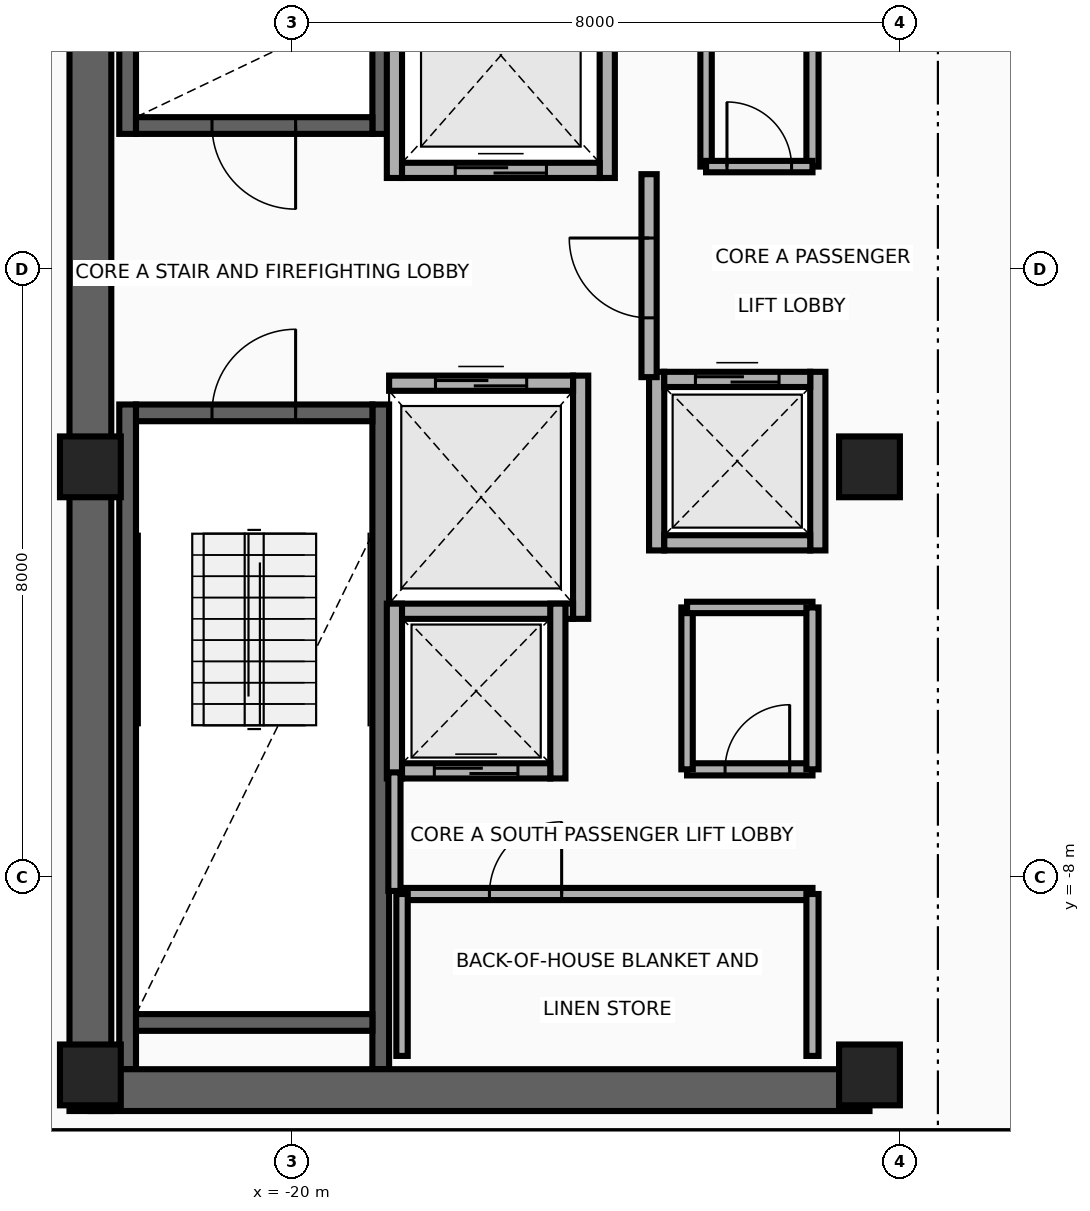
"""IFC4 building model, lengths in metres.
Left out: names, types, materials, properties, quantities, classifications, styles, units other than length and angle.
Written with IfcOpenShell. Run it as: python <this file> out.ifc"""

import sys

from ifc_helpers import new_model, si_unit, direction, frame, frame_2d, origin, origin_2d, place, context, subcontext, project, spatial, rectangle, extrude, source, transform, mapped, element, fill, save


model = new_model("IFC4")
c1 = context("Model", 3, precision=1e-05, world=origin(), true_north=direction((0.0, 1.0)))
c2 = subcontext(c1, "Body", "Model", "MODEL_VIEW")
j1 = project(units=[si_unit("LENGTHUNIT", "METRE"), si_unit("PLANEANGLEUNIT", "RADIAN")], contexts=[c1])
p1 = place(None, origin())
s1 = spatial("IfcSite", under=j1, at=p1, CompositionType="ELEMENT")
p2 = place(p1, origin())
s2 = spatial("IfcBuilding", under=s1, at=p2, CompositionType="ELEMENT")
p3 = place(p2, frame((0.0, 0.0, 269.5)))
s3 = spatial("IfcBuildingStorey", under=s2, at=p3, CompositionType="ELEMENT", Elevation=269.5)
for number, where, z_axis, x_axis in (
    (1, (-22.16, 1.78, 0.0), (0.0, 0.0, 1.0), (0.0, 1.0, 0.0)),
    (2, (-18.83, 1.78, 0.0), (0.0, 0.0, 1.0), (0.0, 1.0, 0.0)),
):
    element("IfcWall", number, at=place(p3, frame(where, z_axis=z_axis, x_axis=x_axis)), inside=s3, PredefinedType="SHEAR", context=c2, shape_type="SweptSolid", body=[
        extrude(rectangle(XDim=8.745, YDim=0.22, at=frame_2d((4.373, 0.0))), origin(), (0.0, 0.0, 1.0), 3.26),
    ])
p4 = place(p3, frame((-22.05, 1.89, 0.0), z_axis=(0.0, 0.0, 1.0), x_axis=(1.0, 0.0, 0.0)))
e3 = element("IfcWall", 3, at=p4, inside=s3, PredefinedType="SHEAR", context=c2, shape_type="SweptSolid", body=[
    extrude(rectangle(XDim=3.11, YDim=0.22, at=frame_2d((1.555, 0.0))), origin(), (0.0, 0.0, 1.0), 3.26),
])
p5 = place(p4, frame((1.0, 0.0, 0.0)))
e4 = element("IfcOpeningElement", 4, at=p5, cuts=e3, PredefinedType="OPENING", context=c2, shape_type="SweptSolid", body=[
    extrude(rectangle(XDim=1.1, YDim=2.15, at=frame_2d((0.55, 1.075))), frame((0.0, 0.125, 0.0), z_axis=(0.0, -1.0, 0.0), x_axis=(1.0, 0.0, 0.0)), (0.0, 0.0, 1.0), 0.25),
])
for number, where, z_axis, x_axis in (
    (5, (-22.16, -10.525, 0.0), (0.0, 0.0, 1.0), (0.0, 1.0, 0.0)),
    (6, (-18.83, -10.525, 0.0), (0.0, 0.0, 1.0), (0.0, 1.0, 0.0)),
):
    element("IfcWall", number, at=place(p3, frame(where, z_axis=z_axis, x_axis=x_axis)), inside=s3, PredefinedType="SHEAR", context=c2, shape_type="SweptSolid", body=[
        extrude(rectangle(XDim=8.745, YDim=0.22, at=frame_2d((4.373, 0.0))), origin(), (0.0, 0.0, 1.0), 3.26),
    ])
p6 = place(p3, frame((-22.05, -9.91, 0.0), z_axis=(0.0, 0.0, 1.0), x_axis=(1.0, 0.0, 0.0)))
e7 = element("IfcWall", 7, at=p6, inside=s3, PredefinedType="SHEAR", context=c2, shape_type="SweptSolid", body=[
    extrude(rectangle(XDim=3.11, YDim=0.22, at=frame_2d((1.555, 0.0))), origin(), (0.0, 0.0, 1.0), 3.26),
])
p7 = place(p3, frame((-22.05, -1.89, 0.0), z_axis=(0.0, 0.0, 1.0), x_axis=(1.0, 0.0, 0.0)))
e8 = element("IfcWall", 8, at=p7, inside=s3, PredefinedType="SHEAR", context=c2, shape_type="SweptSolid", body=[
    extrude(rectangle(XDim=3.11, YDim=0.22, at=frame_2d((1.555, 0.0))), origin(), (0.0, 0.0, 1.0), 3.26),
])
p8 = place(p7, frame((1.0, 0.0, 0.0)))
e9 = element("IfcOpeningElement", 9, at=p8, cuts=e8, PredefinedType="OPENING", context=c2, shape_type="SweptSolid", body=[
    extrude(rectangle(XDim=1.1, YDim=2.15, at=frame_2d((0.55, 1.075))), frame((0.0, 0.125, 0.0), z_axis=(0.0, -1.0, 0.0), x_axis=(1.0, 0.0, 0.0)), (0.0, 0.0, 1.0), 0.25),
])
p9 = place(p3, frame((-22.65, -11.075, 0.0), z_axis=(0.0, 0.0, 1.0), x_axis=(0.0, 1.0, 0.0)))
e10 = element("IfcWall", 10, at=p9, inside=s3, PredefinedType="SHEAR", context=c2, shape_type="SweptSolid", body=[
    extrude(rectangle(XDim=22.15, YDim=0.55, at=frame_2d((11.075, 0.0))), origin(), (0.0, 0.0, 1.0), 3.26),
])
p10 = place(p3, frame((-22.65, -10.8, 0.0), z_axis=(0.0, 0.0, 1.0), x_axis=(1.0, 0.0, 0.0)))
e11 = element("IfcWall", 11, at=p10, inside=s3, PredefinedType="SHEAR", context=c2, shape_type="SweptSolid", body=[
    extrude(rectangle(XDim=10.25, YDim=0.55, at=frame_2d((5.125, 0.0))), origin(), (0.0, 0.0, 1.0), 3.26),
])
m1 = source(origin(), c2, "Body", "SweptSolid", [
    extrude(rectangle(XDim=0.8, YDim=0.8, at=origin_2d()), origin(), (0.0, 0.0, 1.0), 3.5),
])
for number, where, z_axis, x_axis in (
    (12, (-22.65, -10.6, 0.0), (0.0, 0.0, 1.0), (1.0, 0.0, 0.0)),
    (13, (-12.4, -10.6, 0.0), (0.0, 0.0, 1.0), (1.0, 0.0, 0.0)),
    (14, (-22.65, -2.6, 0.0), (0.0, 0.0, 1.0), (1.0, 0.0, 0.0)),
    (15, (-12.4, -2.6, 0.0), (0.0, 0.0, 1.0), (1.0, 0.0, 0.0)),
):
    element("IfcColumn", number, at=place(p3, frame(where, z_axis=z_axis, x_axis=x_axis)), inside=s3, PredefinedType="COLUMN", context=c2, shape_type="MappedRepresentation", body=[
        mapped(m1, transform((0.0, 0.0, 0.0), x_axis=(1.0, 0.0, 0.0), y_axis=(0.0, 1.0, 0.0), z_axis=(0.0, 0.0, 1.0), scale=1.0)),
    ])
for number, where, z_axis, x_axis in (
    (16, (-18.65, 1.2, 0.0), (0.0, 0.0, 1.0), (0.0, 1.0, 0.0)),
    (17, (-15.85, 1.2, 0.0), (0.0, 0.0, 1.0), (0.0, 1.0, 0.0)),
):
    element("IfcWall", number, at=place(p3, frame(where, z_axis=z_axis, x_axis=x_axis)), inside=s3, PredefinedType="MOVABLE", context=c2, shape_type="SweptSolid", body=[
        extrude(rectangle(XDim=3.225, YDim=0.2, at=frame_2d((1.613, 0.0))), origin(), (0.0, 0.0, 1.0), 3.26),
    ])
p11 = place(p3, frame((-18.55, 1.3, 0.0), z_axis=(0.0, 0.0, 1.0), x_axis=(1.0, 0.0, 0.0)))
e18 = element("IfcWall", 18, at=p11, inside=s3, PredefinedType="MOVABLE", context=c2, shape_type="SweptSolid", body=[
    extrude(rectangle(XDim=2.6, YDim=0.2, at=frame_2d((1.3, 0.0))), origin(), (0.0, 0.0, 1.0), 3.26),
])
p12 = place(p11, frame((0.7, 0.0, 0.0)))
e19 = element("IfcOpeningElement", 19, at=p12, cuts=e18, PredefinedType="OPENING", context=c2, shape_type="SweptSolid", body=[
    extrude(rectangle(XDim=1.2, YDim=2.1, at=frame_2d((0.6, 1.05))), frame((0.0, 0.115, 0.0), z_axis=(0.0, -1.0, 0.0), x_axis=(1.0, 0.0, 0.0)), (0.0, 0.0, 1.0), 0.23),
])
p13 = place(p3, frame((-16.2, -4.6, 0.0), z_axis=(0.0, 0.0, 1.0), x_axis=(0.0, 1.0, 0.0)))
e20 = element("IfcWall", 20, at=p13, inside=s3, PredefinedType="MOVABLE", context=c2, shape_type="SweptSolid", body=[
    extrude(rectangle(XDim=3.2, YDim=0.2, at=frame_2d((1.6, 0.0))), origin(), (0.0, 0.0, 1.0), 3.26),
])
p14 = place(p3, frame((-18.72, -4.5, 0.0), z_axis=(0.0, 0.0, 1.0), x_axis=(1.0, 0.0, 0.0)))
e21 = element("IfcWall", 21, at=p14, inside=s3, PredefinedType="MOVABLE", context=c2, shape_type="SweptSolid", body=[
    extrude(rectangle(XDim=2.42, YDim=0.2, at=frame_2d((1.21, 0.0))), origin(), (0.0, 0.0, 1.0), 3.26),
])
p15 = place(p3, frame((-18.72, -1.5, 0.0), z_axis=(0.0, 0.0, 1.0), x_axis=(1.0, 0.0, 0.0)))
e22 = element("IfcWall", 22, at=p15, inside=s3, PredefinedType="MOVABLE", context=c2, shape_type="SweptSolid", body=[
    extrude(rectangle(XDim=2.42, YDim=0.2, at=frame_2d((1.21, 0.0))), origin(), (0.0, 0.0, 1.0), 3.26),
])
p16 = place(p15, frame((0.61, 0.0, 0.0)))
e23 = element("IfcOpeningElement", 23, at=p16, cuts=e22, PredefinedType="OPENING", context=c2, shape_type="SweptSolid", body=[
    extrude(rectangle(XDim=1.2, YDim=2.1, at=frame_2d((0.6, 1.05))), frame((0.0, 0.115, 0.0), z_axis=(0.0, -1.0, 0.0), x_axis=(1.0, 0.0, 0.0)), (0.0, 0.0, 1.0), 0.23),
])
for number, where, z_axis, x_axis in (
    (24, (-18.65, -6.7, 0.0), (0.0, 0.0, 1.0), (0.0, 1.0, 0.0)),
    (25, (-16.5, -6.7, 0.0), (0.0, 0.0, 1.0), (0.0, 1.0, 0.0)),
):
    element("IfcWall", number, at=place(p3, frame(where, z_axis=z_axis, x_axis=x_axis)), inside=s3, PredefinedType="MOVABLE", context=c2, shape_type="SweptSolid", body=[
        extrude(rectangle(XDim=2.3, YDim=0.2, at=frame_2d((1.15, 0.0))), origin(), (0.0, 0.0, 1.0), 3.26),
    ])
p17 = place(p3, frame((-18.55, -6.6, 0.0), z_axis=(0.0, 0.0, 1.0), x_axis=(1.0, 0.0, 0.0)))
e26 = element("IfcWall", 26, at=p17, inside=s3, PredefinedType="MOVABLE", context=c2, shape_type="SweptSolid", body=[
    extrude(rectangle(XDim=1.95, YDim=0.2, at=frame_2d((0.975, 0.0))), origin(), (0.0, 0.0, 1.0), 3.26),
])
p18 = place(p17, frame((0.425, 0.0, 0.0)))
e27 = element("IfcOpeningElement", 27, at=p18, cuts=e26, PredefinedType="OPENING", context=c2, shape_type="SweptSolid", body=[
    extrude(rectangle(XDim=1.1, YDim=2.1, at=frame_2d((0.55, 1.05))), frame((0.0, 0.115, 0.0), z_axis=(0.0, -1.0, 0.0), x_axis=(1.0, 0.0, 0.0)), (0.0, 0.0, 1.0), 0.23),
])
for number, where, z_axis, x_axis in (
    (28, (-15.2, -3.7, 0.0), (0.0, 0.0, 1.0), (0.0, 1.0, 0.0)),
    (29, (-13.08, -3.7, 0.0), (0.0, 0.0, 1.0), (0.0, 1.0, 0.0)),
):
    element("IfcWall", number, at=place(p3, frame(where, z_axis=z_axis, x_axis=x_axis)), inside=s3, PredefinedType="MOVABLE", context=c2, shape_type="SweptSolid", body=[
        extrude(rectangle(XDim=2.35, YDim=0.2, at=frame_2d((1.175, 0.0))), origin(), (0.0, 0.0, 1.0), 3.26),
    ])
p19 = place(p3, frame((-15.1, -3.6, 0.0), z_axis=(0.0, 0.0, 1.0), x_axis=(1.0, 0.0, 0.0)))
e30 = element("IfcWall", 30, at=p19, inside=s3, PredefinedType="MOVABLE", context=c2, shape_type="SweptSolid", body=[
    extrude(rectangle(XDim=1.92, YDim=0.2, at=frame_2d((0.96, 0.0))), origin(), (0.0, 0.0, 1.0), 3.26),
])
p20 = place(p3, frame((-15.1, -1.45, 0.0), z_axis=(0.0, 0.0, 1.0), x_axis=(1.0, 0.0, 0.0)))
e31 = element("IfcWall", 31, at=p20, inside=s3, PredefinedType="MOVABLE", context=c2, shape_type="SweptSolid", body=[
    extrude(rectangle(XDim=1.92, YDim=0.2, at=frame_2d((0.96, 0.0))), origin(), (0.0, 0.0, 1.0), 3.26),
])
p21 = place(p20, frame((0.41, 0.0, 0.0)))
e32 = element("IfcOpeningElement", 32, at=p21, cuts=e31, PredefinedType="OPENING", context=c2, shape_type="SweptSolid", body=[
    extrude(rectangle(XDim=1.1, YDim=2.1, at=frame_2d((0.55, 1.05))), frame((0.0, 0.115, 0.0), z_axis=(0.0, -1.0, 0.0), x_axis=(1.0, 0.0, 0.0)), (0.0, 0.0, 1.0), 0.23),
])
p22 = place(p3, frame((-15.3, -1.42, 0.0), z_axis=(0.0, 0.0, 1.0), x_axis=(0.0, 1.0, 0.0)))
e33 = element("IfcWall", 33, at=p22, inside=s3, PredefinedType="PARTITIONING", context=c2, shape_type="SweptSolid", body=[
    extrude(rectangle(XDim=2.67, YDim=0.2, at=frame_2d((1.335, 0.0))), origin(), (0.0, 0.0, 1.0), 3.26),
])
p23 = place(p22, frame((0.78, 0.0, 0.0)))
e34 = element("IfcOpeningElement", 34, at=p23, cuts=e33, PredefinedType="OPENING", context=c2, shape_type="SweptSolid", body=[
    extrude(rectangle(XDim=1.05, YDim=2.15, at=frame_2d((0.525, 1.075))), frame((0.0, 0.115, 0.0), z_axis=(0.0, -1.0, 0.0), x_axis=(1.0, 0.0, 0.0)), (0.0, 0.0, 1.0), 0.23),
])
p24 = place(p3, frame((-18.65, -8.18, 0.0), z_axis=(0.0, 0.0, 1.0), x_axis=(0.0, 1.0, 0.0)))
e35 = element("IfcWall", 35, at=p24, inside=s3, PredefinedType="PARTITIONING", context=c2, shape_type="SweptSolid", body=[
    extrude(rectangle(XDim=1.56, YDim=0.16, at=frame_2d((0.78, 0.0))), origin(), (0.0, 0.0, 1.0), 3.26),
])
p25 = place(p3, frame((-18.55, -8.22, 0.0), z_axis=(0.0, 0.0, 1.0), x_axis=(1.0, 0.0, 0.0)))
e36 = element("IfcWall", 36, at=p25, inside=s3, PredefinedType="PARTITIONING", context=c2, shape_type="SweptSolid", body=[
    extrude(rectangle(XDim=5.4, YDim=0.16, at=frame_2d((2.7, 0.0))), origin(), (0.0, 0.0, 1.0), 3.26),
])
p26 = place(p25, frame((1.15, 0.0, 0.0)))
e37 = element("IfcOpeningElement", 37, at=p26, cuts=e36, PredefinedType="OPENING", context=c2, shape_type="SweptSolid", body=[
    extrude(rectangle(XDim=0.95, YDim=2.15, at=frame_2d((0.475, 1.075))), frame((0.0, 0.095, 0.0), z_axis=(0.0, -1.0, 0.0), x_axis=(1.0, 0.0, 0.0)), (0.0, 0.0, 1.0), 0.19),
])
p27 = place(p3, frame((-18.55, -10.35, 0.0), z_axis=(0.0, 0.0, 1.0), x_axis=(0.0, 1.0, 0.0)))
e38 = element("IfcWall", 38, at=p27, inside=s3, PredefinedType="PARTITIONING", context=c2, shape_type="SweptSolid", body=[
    extrude(rectangle(XDim=2.13, YDim=0.15, at=frame_2d((1.065, 0.0))), origin(), (0.0, 0.0, 1.0), 3.26),
])
p28 = place(p3, frame((-13.15, -10.35, 0.0), z_axis=(0.0, 0.0, 1.0), x_axis=(0.0, 1.0, 0.0)))
e39 = element("IfcWall", 39, at=p28, inside=s3, PredefinedType="PARTITIONING", context=c2, shape_type="SweptSolid", body=[
    extrude(rectangle(XDim=2.13, YDim=0.16, at=frame_2d((1.065, 0.0))), origin(), (0.0, 0.0, 1.0), 3.26),
])
p29 = place(p3, frame((-14.8, -6.58, 0.0), z_axis=(0.0, 0.0, 1.0), x_axis=(1.0, 0.0, 0.0)))
e40 = element("IfcWall", 40, at=p29, inside=s3, PredefinedType="PARTITIONING", context=c2, shape_type="SweptSolid", body=[
    extrude(rectangle(XDim=1.65, YDim=0.16, at=frame_2d((0.825, 0.0))), origin(), (0.0, 0.0, 1.0), 3.26),
])
p30 = place(p29, frame((0.5, 0.0, 0.0)))
e41 = element("IfcOpeningElement", 41, at=p30, cuts=e40, PredefinedType="OPENING", context=c2, shape_type="SweptSolid", body=[
    extrude(rectangle(XDim=0.85, YDim=2.05, at=frame_2d((0.425, 1.025))), frame((0.0, 0.095, 0.0), z_axis=(0.0, -1.0, 0.0), x_axis=(1.0, 0.0, 0.0)), (0.0, 0.0, 1.0), 0.19),
])
p31 = place(p3, frame((-14.8, -6.58, 0.0), z_axis=(0.0, 0.0, 1.0), x_axis=(0.0, 1.0, 0.0)))
e42 = element("IfcWall", 42, at=p31, inside=s3, PredefinedType="PARTITIONING", context=c2, shape_type="SweptSolid", body=[
    extrude(rectangle(XDim=2.13, YDim=0.15, at=frame_2d((1.065, 0.0))), origin(), (0.0, 0.0, 1.0), 3.26),
])
p32 = place(p3, frame((-14.8, -4.45, 0.0), z_axis=(0.0, 0.0, 1.0), x_axis=(1.0, 0.0, 0.0)))
e43 = element("IfcWall", 43, at=p32, inside=s3, PredefinedType="PARTITIONING", context=c2, shape_type="SweptSolid", body=[
    extrude(rectangle(XDim=1.65, YDim=0.15, at=frame_2d((0.825, 0.0))), origin(), (0.0, 0.0, 1.0), 3.26),
])
p33 = place(p3, frame((-13.15, -6.58, 0.0), z_axis=(0.0, 0.0, 1.0), x_axis=(0.0, 1.0, 0.0)))
e44 = element("IfcWall", 44, at=p33, inside=s3, PredefinedType="PARTITIONING", context=c2, shape_type="SweptSolid", body=[
    extrude(rectangle(XDim=2.13, YDim=0.16, at=frame_2d((1.065, 0.0))), origin(), (0.0, 0.0, 1.0), 3.26),
])
p34 = place(p3, frame((-13.15, 1.35, 0.0), z_axis=(0.0, 0.0, 1.0), x_axis=(0.0, 1.0, 0.0)))
e45 = element("IfcWall", 45, at=p34, inside=s3, PredefinedType="PARTITIONING", context=c2, shape_type="SweptSolid", body=[
    extrude(rectangle(XDim=1.95, YDim=0.16, at=frame_2d((0.975, 0.0))), origin(), (0.0, 0.0, 1.0), 3.26),
])
p35 = place(p3, frame((-14.55, 1.35, 0.0), z_axis=(0.0, 0.0, 1.0), x_axis=(0.0, 1.0, 0.0)))
e46 = element("IfcWall", 46, at=p35, inside=s3, PredefinedType="PARTITIONING", context=c2, shape_type="SweptSolid", body=[
    extrude(rectangle(XDim=1.95, YDim=0.15, at=frame_2d((0.975, 0.0))), origin(), (0.0, 0.0, 1.0), 3.26),
])
p36 = place(p3, frame((-14.55, 1.35, 0.0), z_axis=(0.0, 0.0, 1.0), x_axis=(1.0, 0.0, 0.0)))
e47 = element("IfcWall", 47, at=p36, inside=s3, PredefinedType="PARTITIONING", context=c2, shape_type="SweptSolid", body=[
    extrude(rectangle(XDim=1.4, YDim=0.15, at=frame_2d((0.7, 0.0))), origin(), (0.0, 0.0, 1.0), 3.26),
])
p37 = place(p36, frame((0.275, 0.0, 0.0)))
e48 = element("IfcOpeningElement", 48, at=p37, cuts=e47, PredefinedType="OPENING", context=c2, shape_type="SweptSolid", body=[
    extrude(rectangle(XDim=0.85, YDim=2.05, at=frame_2d((0.425, 1.025))), frame((0.0, 0.09, 0.0), z_axis=(0.0, -1.0, 0.0), x_axis=(1.0, 0.0, 0.0)), (0.0, 0.0, 1.0), 0.18),
])
p38 = place(p3, frame((-23.45, -11.42, 0.0), z_axis=(0.0, 0.0, 1.0), x_axis=(1.0, 0.0, 0.0)))
e49 = element("IfcWall", 49, at=p38, inside=s3, PredefinedType="PARTITIONING", context=c2, shape_type="SweptSolid", body=[
    extrude(rectangle(XDim=13.84, YDim=0.16, at=frame_2d((6.92, 0.0))), origin(), (0.0, 0.0, 1.0), 2.634),
])
p39 = place(p12, origin())
e50 = element("IfcDoor", 50, at=p39, inside=s3, OperationType="DOUBLE_DOOR_SLIDING", PredefinedType="DOOR", context=c2, shape_type="SweptSolid", body=[
    extrude(rectangle(XDim=1.2, YDim=2.1, at=frame_2d((0.6, 1.05))), frame((0.0, 0.025, 0.0), z_axis=(0.0, -1.0, 0.0), x_axis=(1.0, 0.0, 0.0)), (0.0, 0.0, 1.0), 0.05),
])
fill(e19, e50)
p40 = place(p16, origin())
e51 = element("IfcDoor", 51, at=p40, inside=s3, OperationType="DOUBLE_DOOR_SLIDING", PredefinedType="DOOR", context=c2, shape_type="SweptSolid", body=[
    extrude(rectangle(XDim=1.2, YDim=2.1, at=frame_2d((0.6, 1.05))), frame((0.0, 0.025, 0.0), z_axis=(0.0, -1.0, 0.0), x_axis=(1.0, 0.0, 0.0)), (0.0, 0.0, 1.0), 0.05),
])
fill(e23, e51)
p41 = place(p18, origin())
e52 = element("IfcDoor", 52, at=p41, inside=s3, OperationType="DOUBLE_DOOR_SLIDING", PredefinedType="DOOR", context=c2, shape_type="SweptSolid", body=[
    extrude(rectangle(XDim=1.1, YDim=2.1, at=frame_2d((0.55, 1.05))), frame((0.0, 0.025, 0.0), z_axis=(0.0, -1.0, 0.0), x_axis=(1.0, 0.0, 0.0)), (0.0, 0.0, 1.0), 0.05),
])
fill(e27, e52)
p42 = place(p21, origin())
e53 = element("IfcDoor", 53, at=p42, inside=s3, OperationType="DOUBLE_DOOR_SLIDING", PredefinedType="DOOR", context=c2, shape_type="SweptSolid", body=[
    extrude(rectangle(XDim=1.1, YDim=2.1, at=frame_2d((0.55, 1.05))), frame((0.0, 0.025, 0.0), z_axis=(0.0, -1.0, 0.0), x_axis=(1.0, 0.0, 0.0)), (0.0, 0.0, 1.0), 0.05),
])
fill(e32, e53)
p43 = place(p23, origin())
e54 = element("IfcDoor", 54, at=p43, inside=s3, OperationType="SINGLE_SWING_RIGHT", PredefinedType="DOOR", context=c2, shape_type="SweptSolid", body=[
    extrude(rectangle(XDim=1.05, YDim=2.15, at=frame_2d((0.525, 1.075))), frame((0.0, 0.025, 0.0), z_axis=(0.0, -1.0, 0.0), x_axis=(1.0, 0.0, 0.0)), (0.0, 0.0, 1.0), 0.05),
])
fill(e34, e54)
p44 = place(p5, frame((1.1, 0.0, 0.0), z_axis=(0.0, 0.0, 1.0), x_axis=(-1.0, 0.0, 0.0)))
e55 = element("IfcDoor", 55, at=p44, inside=s3, OperationType="SINGLE_SWING_LEFT", PredefinedType="DOOR", context=c2, shape_type="SweptSolid", body=[
    extrude(rectangle(XDim=1.1, YDim=2.15, at=frame_2d((0.55, 1.075))), frame((0.0, 0.025, 0.0), z_axis=(0.0, -1.0, 0.0), x_axis=(1.0, 0.0, 0.0)), (0.0, 0.0, 1.0), 0.05),
])
fill(e4, e55)
p45 = place(p8, origin())
e56 = element("IfcDoor", 56, at=p45, inside=s3, OperationType="SINGLE_SWING_RIGHT", PredefinedType="DOOR", context=c2, shape_type="SweptSolid", body=[
    extrude(rectangle(XDim=1.1, YDim=2.15, at=frame_2d((0.55, 1.075))), frame((0.0, 0.025, 0.0), z_axis=(0.0, -1.0, 0.0), x_axis=(1.0, 0.0, 0.0)), (0.0, 0.0, 1.0), 0.05),
])
fill(e9, e56)
p46 = place(p26, origin())
e57 = element("IfcDoor", 57, at=p46, inside=s3, OperationType="SINGLE_SWING_RIGHT", PredefinedType="DOOR", context=c2, shape_type="SweptSolid", body=[
    extrude(rectangle(XDim=0.95, YDim=2.15, at=frame_2d((0.475, 1.075))), frame((0.0, 0.025, 0.0), z_axis=(0.0, -1.0, 0.0), x_axis=(1.0, 0.0, 0.0)), (0.0, 0.0, 1.0), 0.05),
])
fill(e37, e57)
p47 = place(p30, origin())
e58 = element("IfcDoor", 58, at=p47, inside=s3, OperationType="SINGLE_SWING_LEFT", PredefinedType="DOOR", context=c2, shape_type="SweptSolid", body=[
    extrude(rectangle(XDim=0.85, YDim=2.05, at=frame_2d((0.425, 1.025))), frame((0.0, 0.025, 0.0), z_axis=(0.0, -1.0, 0.0), x_axis=(1.0, 0.0, 0.0)), (0.0, 0.0, 1.0), 0.05),
])
fill(e41, e58)
p48 = place(p37, origin())
e59 = element("IfcDoor", 59, at=p48, inside=s3, OperationType="SINGLE_SWING_RIGHT", PredefinedType="DOOR", context=c2, shape_type="SweptSolid", body=[
    extrude(rectangle(XDim=0.85, YDim=2.05, at=frame_2d((0.425, 1.025))), frame((0.0, 0.025, 0.0), z_axis=(0.0, -1.0, 0.0), x_axis=(1.0, 0.0, 0.0)), (0.0, 0.0, 1.0), 0.05),
])
fill(e48, e59)
save(model, sys.argv[1])
